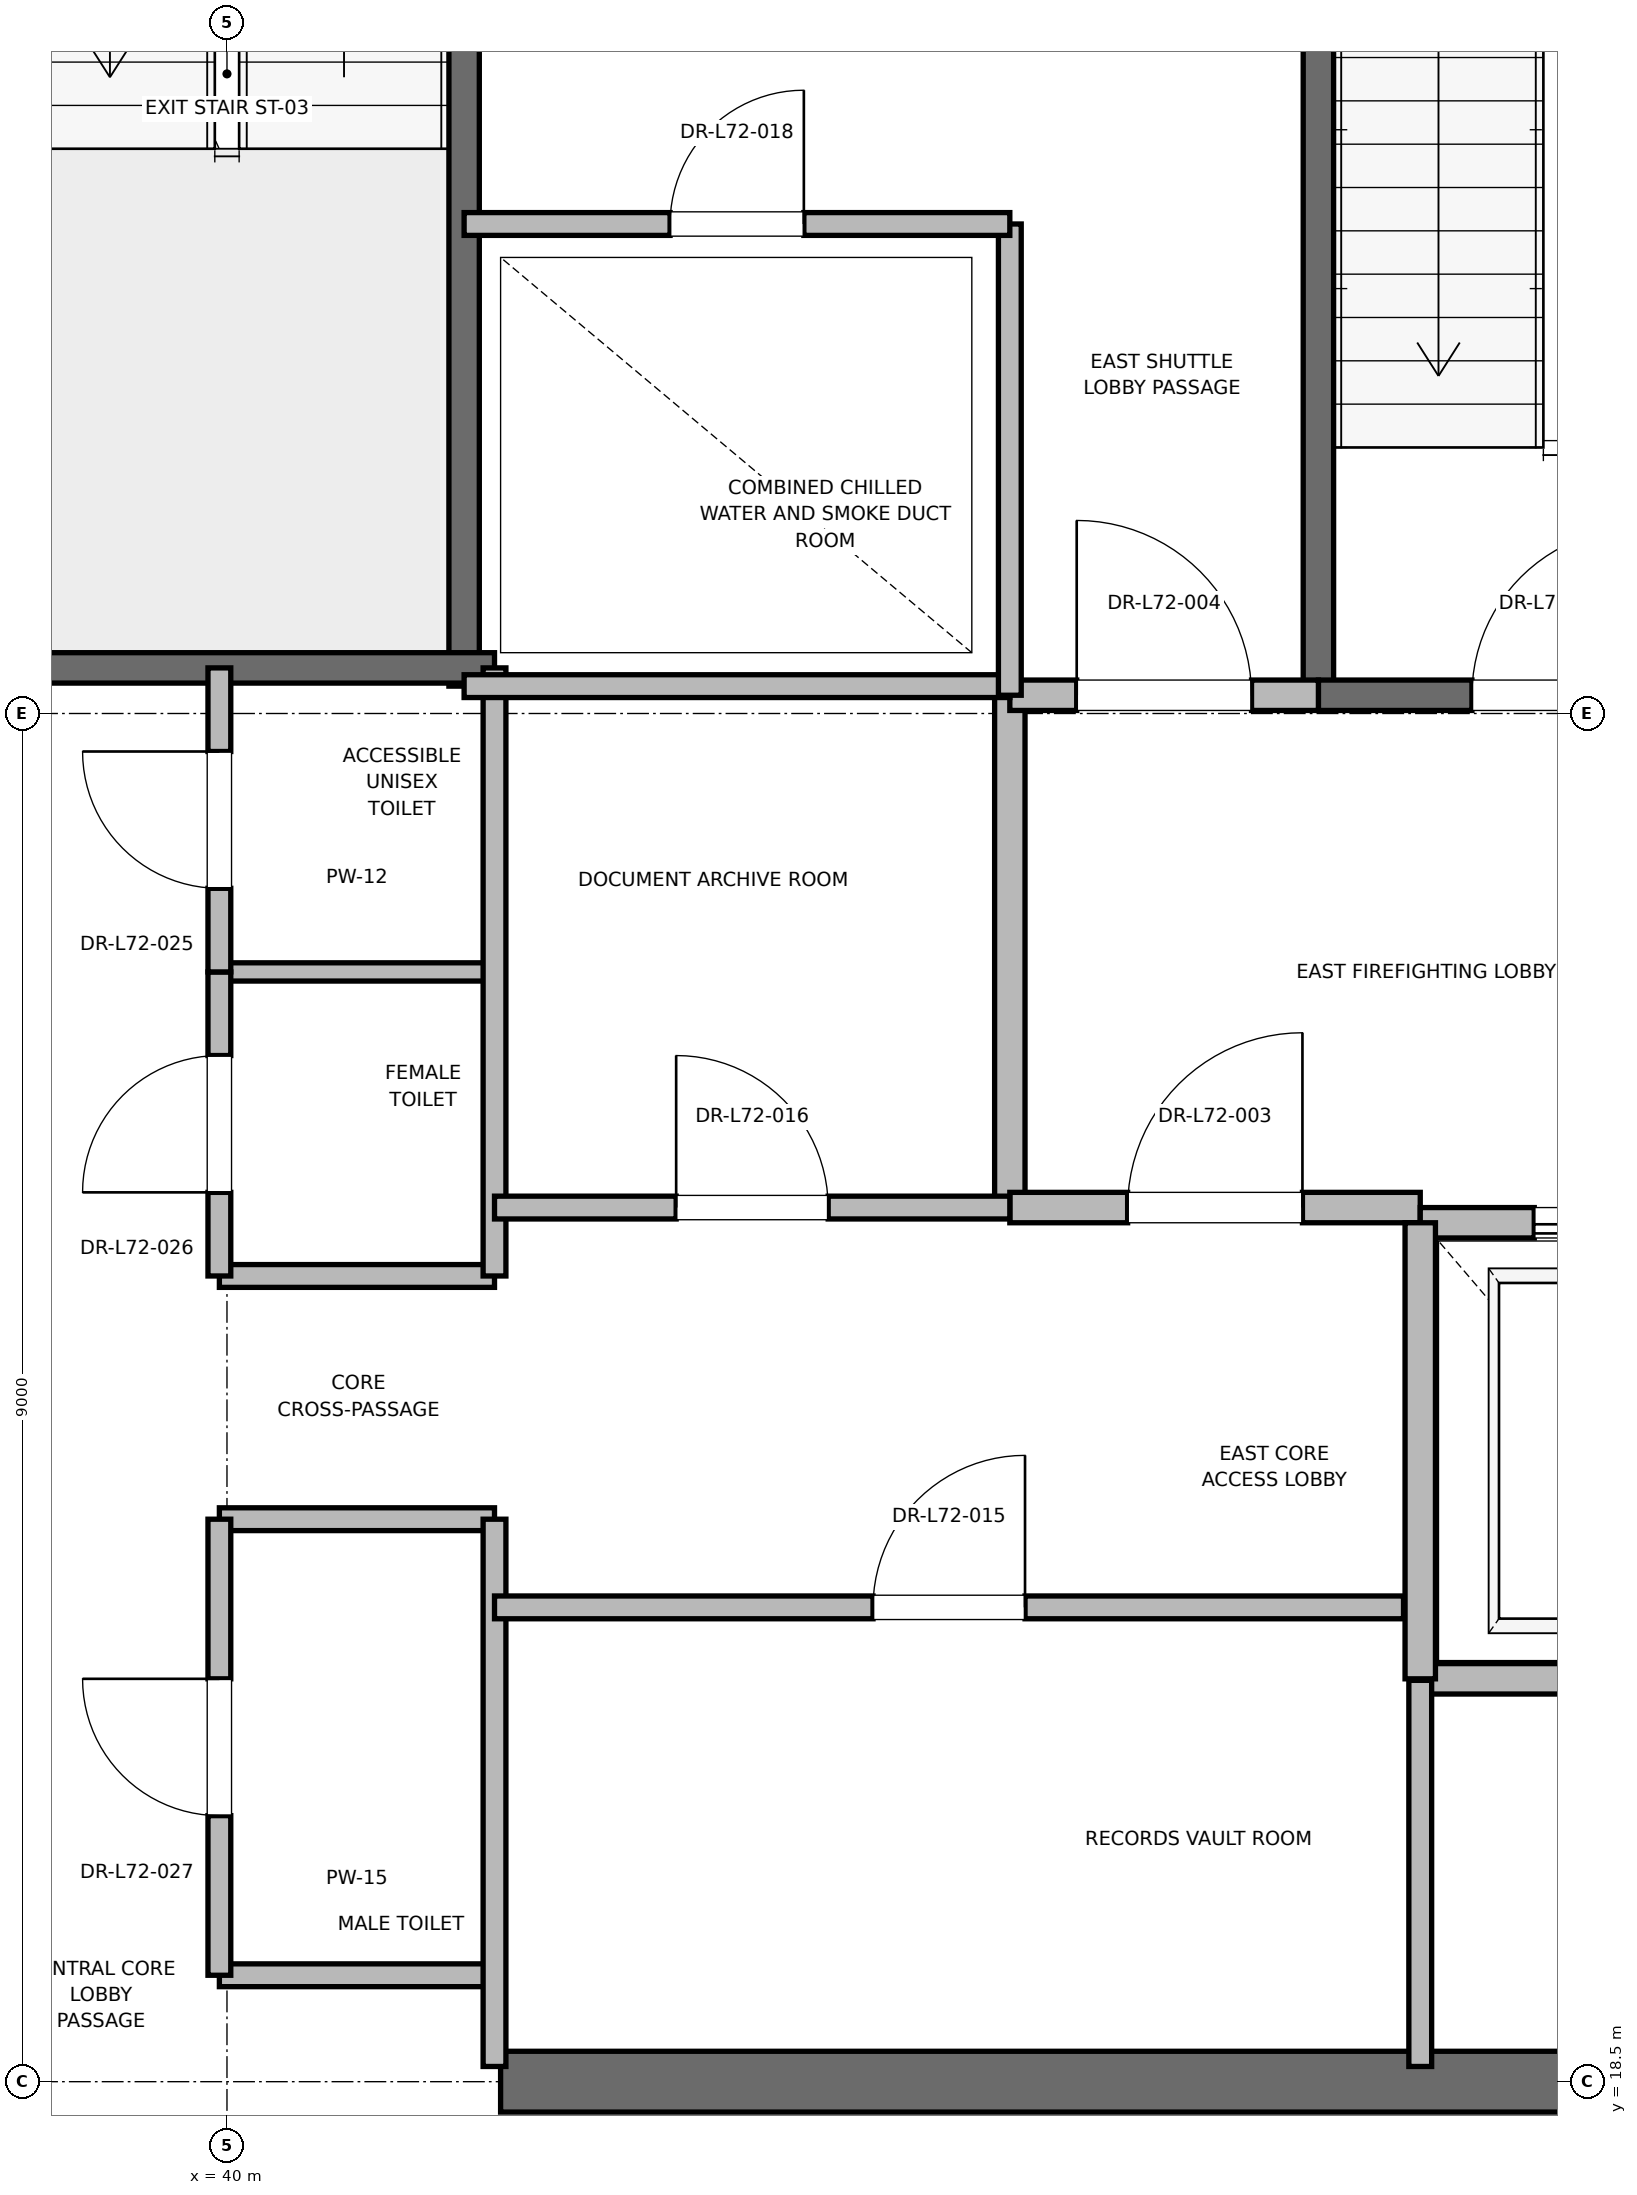
"""IFC4 building model, lengths in metres.
Left out: names, types, materials, properties, quantities, classifications, styles, units other than length and angle.
Written with IfcOpenShell. Run it as: python <this file> out.ifc"""

import sys

from ifc_helpers import new_model, si_unit, direction, frame, frame_2d, origin, place, context, subcontext, project, spatial, rectangle, extrude, element, fill, save


model = new_model("IFC4")
c1 = context("Model", 3, precision=1e-05, world=origin(), true_north=direction((0.0, 1.0)))
c2 = subcontext(c1, "Body", "Model", "MODEL_VIEW")
j1 = project(units=[si_unit("LENGTHUNIT", "METRE"), si_unit("PLANEANGLEUNIT", "RADIAN")], contexts=[c1])
p1 = place(None, origin())
s1 = spatial("IfcSite", under=j1, at=p1, CompositionType="ELEMENT")
p2 = place(p1, origin())
s2 = spatial("IfcBuilding", under=s1, at=p2, CompositionType="ELEMENT")
p3 = place(p2, frame((0.0, 0.0, 310.8)))
s3 = spatial("IfcBuildingStorey", under=s2, at=p3, CompositionType="ELEMENT", Elevation=310.8)
p4 = place(p3, frame((41.8, 18.5, 0.0), z_axis=(0.0, 0.0, 1.0), x_axis=(1.0, 0.0, 0.0)))
e1 = element("IfcWall", 1, at=p4, inside=s3, PredefinedType="SHEAR", context=c2, shape_type="SweptSolid", body=[
    extrude(rectangle(XDim=9.2, YDim=0.4, at=frame_2d((4.6, 0.0))), origin(), (0.0, 0.0, 1.0), 3.785),
])
p5 = place(p3, frame((47.18, 27.62, 0.0), z_axis=(0.0, 0.0, 1.0), x_axis=(0.0, 1.0, 0.0)))
e2 = element("IfcWall", 2, at=p5, inside=s3, PredefinedType="SOLIDWALL", context=c2, shape_type="SweptSolid", body=[
    extrude(rectangle(XDim=8.18, YDim=0.2, at=frame_2d((4.09, 0.0))), origin(), (0.0, 0.0, 1.0), 3.785),
])
p6 = place(p3, frame((47.18, 27.62, 0.0), z_axis=(0.0, 0.0, 1.0), x_axis=(1.0, 0.0, 0.0)))
e3 = element("IfcWall", 3, at=p6, inside=s3, PredefinedType="SOLIDWALL", context=c2, shape_type="SweptSolid", body=[
    extrude(rectangle(XDim=3.12, YDim=0.2, at=frame_2d((1.56, 0.0))), origin(), (0.0, 0.0, 1.0), 3.785),
])
p7 = place(p6, frame((1.01, 0.0, 0.0)))
e4 = element("IfcOpeningElement", 4, at=p7, cuts=e3, PredefinedType="OPENING", context=c2, shape_type="SweptSolid", body=[
    extrude(rectangle(XDim=1.1, YDim=2.15, at=frame_2d((0.55, 1.075))), frame((0.0, 0.1, 0.0), z_axis=(0.0, -1.0, 0.0), x_axis=(1.0, 0.0, 0.0)), (0.0, 0.0, 1.0), 0.2),
])
p8 = place(p3, frame((41.56, 27.68, 0.0), z_axis=(0.0, 0.0, 1.0), x_axis=(0.0, 1.0, 0.0)))
e5 = element("IfcWall", 5, at=p8, inside=s3, PredefinedType="SOLIDWALL", context=c2, shape_type="SweptSolid", body=[
    extrude(rectangle(XDim=8.57, YDim=0.2, at=frame_2d((4.285, 0.0))), origin(), (0.0, 0.0, 1.0), 3.785),
])
p9 = place(p3, frame((38.44, 27.8, 0.0), z_axis=(0.0, 0.0, 1.0), x_axis=(1.0, 0.0, 0.0)))
e6 = element("IfcWall", 6, at=p9, inside=s3, PredefinedType="SOLIDWALL", context=c2, shape_type="SweptSolid", body=[
    extrude(rectangle(XDim=3.32, YDim=0.2, at=frame_2d((1.66, 0.0))), origin(), (0.0, 0.0, 1.0), 3.785),
])
p10 = place(p3, frame((45.15, 24.25, 0.0), z_axis=(0.0, 0.0, 1.0), x_axis=(0.0, 1.0, 0.0)))
e7 = element("IfcWall", 7, at=p10, inside=s3, PredefinedType="PARTITIONING", context=c2, shape_type="SweptSolid", body=[
    extrude(rectangle(XDim=3.37, YDim=0.2, at=frame_2d((1.685, 0.0))), origin(), (0.0, 0.0, 1.0), 3.785),
])
p11 = place(p3, frame((45.15, 24.25, 0.0), z_axis=(0.0, 0.0, 1.0), x_axis=(1.0, 0.0, 0.0)))
e8 = element("IfcWall", 8, at=p11, inside=s3, PredefinedType="PARTITIONING", context=c2, shape_type="SweptSolid", body=[
    extrude(rectangle(XDim=2.7, YDim=0.2, at=frame_2d((1.35, 0.0))), origin(), (0.0, 0.0, 1.0), 3.785),
])
p12 = place(p11, frame((0.775, 0.0, 0.0)))
e9 = element("IfcOpeningElement", 9, at=p12, cuts=e8, PredefinedType="OPENING", context=c2, shape_type="SweptSolid", body=[
    extrude(rectangle(XDim=1.15, YDim=2.2, at=frame_2d((0.575, 1.1))), frame((0.0, 0.1, 0.0), z_axis=(0.0, -1.0, 0.0), x_axis=(1.0, 0.0, 0.0)), (0.0, 0.0, 1.0), 0.2),
])
p13 = place(p3, frame((45.15, 27.62, 0.0), z_axis=(0.0, 0.0, 1.0), x_axis=(1.0, 0.0, 0.0)))
e10 = element("IfcWall", 10, at=p13, inside=s3, PredefinedType="PARTITIONING", context=c2, shape_type="SweptSolid", body=[
    extrude(rectangle(XDim=2.03, YDim=0.2, at=frame_2d((1.015, 0.0))), origin(), (0.0, 0.0, 1.0), 3.785),
])
p14 = place(p13, frame((0.44, 0.0, 0.0)))
e11 = element("IfcOpeningElement", 11, at=p14, cuts=e10, PredefinedType="OPENING", context=c2, shape_type="SweptSolid", body=[
    extrude(rectangle(XDim=1.15, YDim=2.2, at=frame_2d((0.575, 1.1))), frame((0.0, 0.1, 0.0), z_axis=(0.0, -1.0, 0.0), x_axis=(1.0, 0.0, 0.0)), (0.0, 0.0, 1.0), 0.2),
])
p15 = place(p3, frame((47.85, 21.15, 0.0), z_axis=(0.0, 0.0, 1.0), x_axis=(1.0, 0.0, 0.0)))
e12 = element("IfcWall", 12, at=p15, inside=s3, PredefinedType="SOLIDWALL", context=c2, shape_type="SweptSolid", body=[
    extrude(rectangle(XDim=2.6, YDim=0.2, at=frame_2d((1.3, 0.0))), origin(), (0.0, 0.0, 1.0), 3.785),
])
p16 = place(p3, frame((50.45, 24.15, 0.0), z_axis=(0.0, 0.0, 1.0), x_axis=(-1.0, 0.0, 0.0)))
e13 = element("IfcWall", 13, at=p16, inside=s3, PredefinedType="SOLIDWALL", context=c2, shape_type="SweptSolid", body=[
    extrude(rectangle(XDim=2.6, YDim=0.2, at=frame_2d((1.3, 0.0))), origin(), (0.0, 0.0, 1.0), 2.865),
])
p17 = place(p16, frame((0.75, 0.0, 0.0)))
e14 = element("IfcOpeningElement", 14, at=p17, cuts=e13, PredefinedType="OPENING", context=c2, shape_type="SweptSolid", body=[
    extrude(rectangle(XDim=1.1, YDim=2.2, at=frame_2d((0.55, 1.1))), frame((0.0, 0.1, 0.0), z_axis=(0.0, -1.0, 0.0), x_axis=(1.0, 0.0, 0.0)), (0.0, 0.0, 1.0), 0.2),
])
p18 = place(p3, frame((47.85, 24.15, 0.0), z_axis=(0.0, 0.0, 1.0), x_axis=(0.0, -1.0, 0.0)))
e15 = element("IfcWall", 15, at=p18, inside=s3, PredefinedType="SOLIDWALL", context=c2, shape_type="SweptSolid", body=[
    extrude(rectangle(XDim=3.0, YDim=0.2, at=frame_2d((1.5, 0.0))), origin(), (0.0, 0.0, 1.0), 3.785),
])
for number, where, z_axis, x_axis in (
    (16, (39.95, 19.2, 0.0), (0.0, 0.0, 1.0), (1.0, 0.0, 0.0)),
    (17, (39.95, 22.2, 0.0), (0.0, 0.0, 1.0), (1.0, 0.0, 0.0)),
    (18, (39.95, 23.8, 0.0), (0.0, 0.0, 1.0), (1.0, 0.0, 0.0)),
):
    element("IfcWall", number, at=place(p3, frame(where, z_axis=z_axis, x_axis=x_axis)), inside=s3, PredefinedType="PARTITIONING", context=c2, shape_type="SweptSolid", body=[
        extrude(rectangle(XDim=1.81, YDim=0.15, at=frame_2d((0.905, 0.0))), origin(), (0.0, 0.0, 1.0), 2.85),
    ])
p19 = place(p3, frame((39.95, 25.8, 0.0), z_axis=(0.0, 0.0, 1.0), x_axis=(1.0, 0.0, 0.0)))
e19 = element("IfcWall", 19, at=p19, inside=s3, PredefinedType="PARTITIONING", context=c2, shape_type="SweptSolid", body=[
    extrude(rectangle(XDim=1.81, YDim=0.12, at=frame_2d((0.905, 0.0))), origin(), (0.0, 0.0, 1.0), 2.85),
])
p20 = place(p3, frame((41.76, 18.6, 0.0), z_axis=(0.0, 0.0, 1.0), x_axis=(0.0, 1.0, 0.0)))
e20 = element("IfcWall", 20, at=p20, inside=s3, PredefinedType="PARTITIONING", context=c2, shape_type="SweptSolid", body=[
    extrude(rectangle(XDim=3.6, YDim=0.15, at=frame_2d((1.8, 0.0))), origin(), (0.0, 0.0, 1.0), 2.85),
])
p21 = place(p3, frame((41.76, 23.8, 0.0), z_axis=(0.0, 0.0, 1.0), x_axis=(0.0, 1.0, 0.0)))
e21 = element("IfcWall", 21, at=p21, inside=s3, PredefinedType="PARTITIONING", context=c2, shape_type="SweptSolid", body=[
    extrude(rectangle(XDim=4.0, YDim=0.15, at=frame_2d((2.0, 0.0))), origin(), (0.0, 0.0, 1.0), 2.85),
])
p22 = place(p3, frame((39.95, 19.2, 0.0), z_axis=(0.0, 0.0, 1.0), x_axis=(0.0, 1.0, 0.0)))
e22 = element("IfcWall", 22, at=p22, inside=s3, PredefinedType="PARTITIONING", context=c2, shape_type="SweptSolid", body=[
    extrude(rectangle(XDim=3.0, YDim=0.15, at=frame_2d((1.5, 0.0))), origin(), (0.0, 0.0, 1.0), 2.85),
])
p23 = place(p22, frame((1.05, 0.0, 0.0)))
e23 = element("IfcOpeningElement", 23, at=p23, cuts=e22, PredefinedType="OPENING", context=c2, shape_type="SweptSolid", body=[
    extrude(rectangle(XDim=0.9, YDim=2.1, at=frame_2d((0.45, 1.05))), frame((0.0, 0.075, 0.0), z_axis=(0.0, -1.0, 0.0), x_axis=(1.0, 0.0, 0.0)), (0.0, 0.0, 1.0), 0.15),
])
p24 = place(p3, frame((39.95, 23.8, 0.0), z_axis=(0.0, 0.0, 1.0), x_axis=(0.0, 1.0, 0.0)))
e24 = element("IfcWall", 24, at=p24, inside=s3, PredefinedType="PARTITIONING", context=c2, shape_type="SweptSolid", body=[
    extrude(rectangle(XDim=2.0, YDim=0.15, at=frame_2d((1.0, 0.0))), origin(), (0.0, 0.0, 1.0), 2.85),
])
p25 = place(p24, frame((0.55, 0.0, 0.0)))
e25 = element("IfcOpeningElement", 25, at=p25, cuts=e24, PredefinedType="OPENING", context=c2, shape_type="SweptSolid", body=[
    extrude(rectangle(XDim=0.9, YDim=2.1, at=frame_2d((0.45, 1.05))), frame((0.0, 0.075, 0.0), z_axis=(0.0, -1.0, 0.0), x_axis=(1.0, 0.0, 0.0)), (0.0, 0.0, 1.0), 0.15),
])
p26 = place(p3, frame((39.95, 25.8, 0.0), z_axis=(0.0, 0.0, 1.0), x_axis=(0.0, 1.0, 0.0)))
e26 = element("IfcWall", 26, at=p26, inside=s3, PredefinedType="PARTITIONING", context=c2, shape_type="SweptSolid", body=[
    extrude(rectangle(XDim=2.0, YDim=0.15, at=frame_2d((1.0, 0.0))), origin(), (0.0, 0.0, 1.0), 2.85),
])
p27 = place(p26, frame((0.55, 0.0, 0.0)))
e27 = element("IfcOpeningElement", 27, at=p27, cuts=e26, PredefinedType="OPENING", context=c2, shape_type="SweptSolid", body=[
    extrude(rectangle(XDim=0.9, YDim=2.1, at=frame_2d((0.45, 1.05))), frame((0.0, 0.075, 0.0), z_axis=(0.0, -1.0, 0.0), x_axis=(1.0, 0.0, 0.0)), (0.0, 0.0, 1.0), 0.15),
])
p28 = place(p3, frame((41.56, 27.68, 0.0), z_axis=(0.0, 0.0, 1.0), x_axis=(1.0, 0.0, 0.0)))
e28 = element("IfcWall", 28, at=p28, inside=s3, PredefinedType="PARTITIONING", context=c2, shape_type="SweptSolid", body=[
    extrude(rectangle(XDim=3.59, YDim=0.15, at=frame_2d((1.795, 0.0))), origin(), (0.0, 0.0, 1.0), 2.85),
])
p29 = place(p3, frame((47.85, 18.6, 0.0), z_axis=(0.0, 0.0, 1.0), x_axis=(0.0, 1.0, 0.0)))
e29 = element("IfcWall", 29, at=p29, inside=s3, PredefinedType="PARTITIONING", context=c2, shape_type="SweptSolid", body=[
    extrude(rectangle(XDim=2.54, YDim=0.15, at=frame_2d((1.27, 0.0))), origin(), (0.0, 0.0, 1.0), 2.85),
])
p30 = place(p3, frame((41.76, 21.62, 0.0), z_axis=(0.0, 0.0, 1.0), x_axis=(1.0, 0.0, 0.0)))
e30 = element("IfcWall", 30, at=p30, inside=s3, PredefinedType="PARTITIONING", context=c2, shape_type="SweptSolid", body=[
    extrude(rectangle(XDim=5.98, YDim=0.15, at=frame_2d((2.99, 0.0))), origin(), (0.0, 0.0, 1.0), 2.85),
])
p31 = place(p30, frame((2.49, 0.0, 0.0)))
e31 = element("IfcOpeningElement", 31, at=p31, cuts=e30, PredefinedType="OPENING", context=c2, shape_type="SweptSolid", body=[
    extrude(rectangle(XDim=1.0, YDim=2.15, at=frame_2d((0.5, 1.075))), frame((0.0, 0.075, 0.0), z_axis=(0.0, -1.0, 0.0), x_axis=(1.0, 0.0, 0.0)), (0.0, 0.0, 1.0), 0.15),
])
p32 = place(p3, frame((41.76, 24.25, 0.0), z_axis=(0.0, 0.0, 1.0), x_axis=(1.0, 0.0, 0.0)))
e32 = element("IfcWall", 32, at=p32, inside=s3, PredefinedType="PARTITIONING", context=c2, shape_type="SweptSolid", body=[
    extrude(rectangle(XDim=3.39, YDim=0.15, at=frame_2d((1.695, 0.0))), origin(), (0.0, 0.0, 1.0), 2.85),
])
p33 = place(p32, frame((1.195, 0.0, 0.0)))
e33 = element("IfcOpeningElement", 33, at=p33, cuts=e32, PredefinedType="OPENING", context=c2, shape_type="SweptSolid", body=[
    extrude(rectangle(XDim=1.0, YDim=2.15, at=frame_2d((0.5, 1.075))), frame((0.0, 0.075, 0.0), z_axis=(0.0, -1.0, 0.0), x_axis=(1.0, 0.0, 0.0)), (0.0, 0.0, 1.0), 0.15),
])
p34 = place(p3, frame((45.15, 27.62, 0.0), z_axis=(0.0, 0.0, 1.0), x_axis=(0.0, 1.0, 0.0)))
e34 = element("IfcWall", 34, at=p34, inside=s3, PredefinedType="PARTITIONING", context=c2, shape_type="SweptSolid", body=[
    extrude(rectangle(XDim=3.1, YDim=0.15, at=frame_2d((1.55, 0.0))), origin(), (0.0, 0.0, 1.0), 2.85),
])
p35 = place(p3, frame((41.56, 30.72, 0.0), z_axis=(0.0, 0.0, 1.0), x_axis=(1.0, 0.0, 0.0)))
e35 = element("IfcWall", 35, at=p35, inside=s3, PredefinedType="PARTITIONING", context=c2, shape_type="SweptSolid", body=[
    extrude(rectangle(XDim=3.59, YDim=0.15, at=frame_2d((1.795, 0.0))), origin(), (0.0, 0.0, 1.0), 2.85),
])
p36 = place(p35, frame((1.355, 0.0, 0.0)))
e36 = element("IfcOpeningElement", 36, at=p36, cuts=e35, PredefinedType="OPENING", context=c2, shape_type="SweptSolid", body=[
    extrude(rectangle(XDim=0.88, YDim=2.1, at=frame_2d((0.44, 1.05))), frame((0.0, 0.075, 0.0), z_axis=(0.0, -1.0, 0.0), x_axis=(1.0, 0.0, 0.0)), (0.0, 0.0, 1.0), 0.15),
])
p37 = place(p7, origin())
e37 = element("IfcDoor", 37, at=p37, inside=s3, OperationType="SINGLE_SWING_RIGHT", PredefinedType="DOOR", context=c2, shape_type="SweptSolid", body=[
    extrude(rectangle(XDim=1.1, YDim=2.15, at=frame_2d((0.55, 1.075))), frame((0.0, 0.025, 0.0), z_axis=(0.0, -1.0, 0.0), x_axis=(1.0, 0.0, 0.0)), (0.0, 0.0, 1.0), 0.05),
])
fill(e4, e37)
p38 = place(p12, origin())
e38 = element("IfcDoor", 38, at=p38, inside=s3, OperationType="SINGLE_SWING_RIGHT", PredefinedType="DOOR", context=c2, shape_type="SweptSolid", body=[
    extrude(rectangle(XDim=1.15, YDim=2.2, at=frame_2d((0.575, 1.1))), frame((0.0, 0.025, 0.0), z_axis=(0.0, -1.0, 0.0), x_axis=(1.0, 0.0, 0.0)), (0.0, 0.0, 1.0), 0.05),
])
fill(e9, e38)
p39 = place(p14, origin())
e39 = element("IfcDoor", 39, at=p39, inside=s3, OperationType="SINGLE_SWING_LEFT", PredefinedType="DOOR", context=c2, shape_type="SweptSolid", body=[
    extrude(rectangle(XDim=1.15, YDim=2.2, at=frame_2d((0.575, 1.1))), frame((0.0, 0.025, 0.0), z_axis=(0.0, -1.0, 0.0), x_axis=(1.0, 0.0, 0.0)), (0.0, 0.0, 1.0), 0.05),
])
fill(e11, e39)
p40 = place(p17, origin())
e40 = element("IfcDoor", 40, at=p40, inside=s3, OperationType="SLIDING_TO_RIGHT", PredefinedType="DOOR", context=c2, shape_type="SweptSolid", body=[
    extrude(rectangle(XDim=1.1, YDim=2.2, at=frame_2d((0.55, 1.1))), frame((0.0, 0.025, 0.0), z_axis=(0.0, -1.0, 0.0), x_axis=(1.0, 0.0, 0.0)), (0.0, 0.0, 1.0), 0.05),
])
fill(e14, e40)
p41 = place(p23, origin())
e41 = element("IfcDoor", 41, at=p41, inside=s3, OperationType="SINGLE_SWING_RIGHT", PredefinedType="DOOR", context=c2, shape_type="SweptSolid", body=[
    extrude(rectangle(XDim=0.9, YDim=2.1, at=frame_2d((0.45, 1.05))), frame((0.0, 0.025, 0.0), z_axis=(0.0, -1.0, 0.0), x_axis=(1.0, 0.0, 0.0)), (0.0, 0.0, 1.0), 0.05),
])
fill(e23, e41)
p42 = place(p25, origin())
e42 = element("IfcDoor", 42, at=p42, inside=s3, OperationType="SINGLE_SWING_LEFT", PredefinedType="DOOR", context=c2, shape_type="SweptSolid", body=[
    extrude(rectangle(XDim=0.9, YDim=2.1, at=frame_2d((0.45, 1.05))), frame((0.0, 0.025, 0.0), z_axis=(0.0, -1.0, 0.0), x_axis=(1.0, 0.0, 0.0)), (0.0, 0.0, 1.0), 0.05),
])
fill(e25, e42)
p43 = place(p27, origin())
e43 = element("IfcDoor", 43, at=p43, inside=s3, OperationType="SINGLE_SWING_RIGHT", PredefinedType="DOOR", context=c2, shape_type="SweptSolid", body=[
    extrude(rectangle(XDim=0.9, YDim=2.1, at=frame_2d((0.45, 1.05))), frame((0.0, 0.025, 0.0), z_axis=(0.0, -1.0, 0.0), x_axis=(1.0, 0.0, 0.0)), (0.0, 0.0, 1.0), 0.05),
])
fill(e27, e43)
p44 = place(p31, origin())
e44 = element("IfcDoor", 44, at=p44, inside=s3, OperationType="SINGLE_SWING_RIGHT", PredefinedType="DOOR", context=c2, shape_type="SweptSolid", body=[
    extrude(rectangle(XDim=1.0, YDim=2.15, at=frame_2d((0.5, 1.075))), frame((0.0, 0.025, 0.0), z_axis=(0.0, -1.0, 0.0), x_axis=(1.0, 0.0, 0.0)), (0.0, 0.0, 1.0), 0.05),
])
fill(e31, e44)
p45 = place(p33, origin())
e45 = element("IfcDoor", 45, at=p45, inside=s3, OperationType="SINGLE_SWING_LEFT", PredefinedType="DOOR", context=c2, shape_type="SweptSolid", body=[
    extrude(rectangle(XDim=1.0, YDim=2.15, at=frame_2d((0.5, 1.075))), frame((0.0, 0.025, 0.0), z_axis=(0.0, -1.0, 0.0), x_axis=(1.0, 0.0, 0.0)), (0.0, 0.0, 1.0), 0.05),
])
fill(e33, e45)
p46 = place(p36, origin())
e46 = element("IfcDoor", 46, at=p46, inside=s3, OperationType="SINGLE_SWING_RIGHT", PredefinedType="DOOR", context=c2, shape_type="SweptSolid", body=[
    extrude(rectangle(XDim=0.88, YDim=2.1, at=frame_2d((0.44, 1.05))), frame((0.0, 0.025, 0.0), z_axis=(0.0, -1.0, 0.0), x_axis=(1.0, 0.0, 0.0)), (0.0, 0.0, 1.0), 0.05),
])
fill(e36, e46)
save(model, sys.argv[1])
